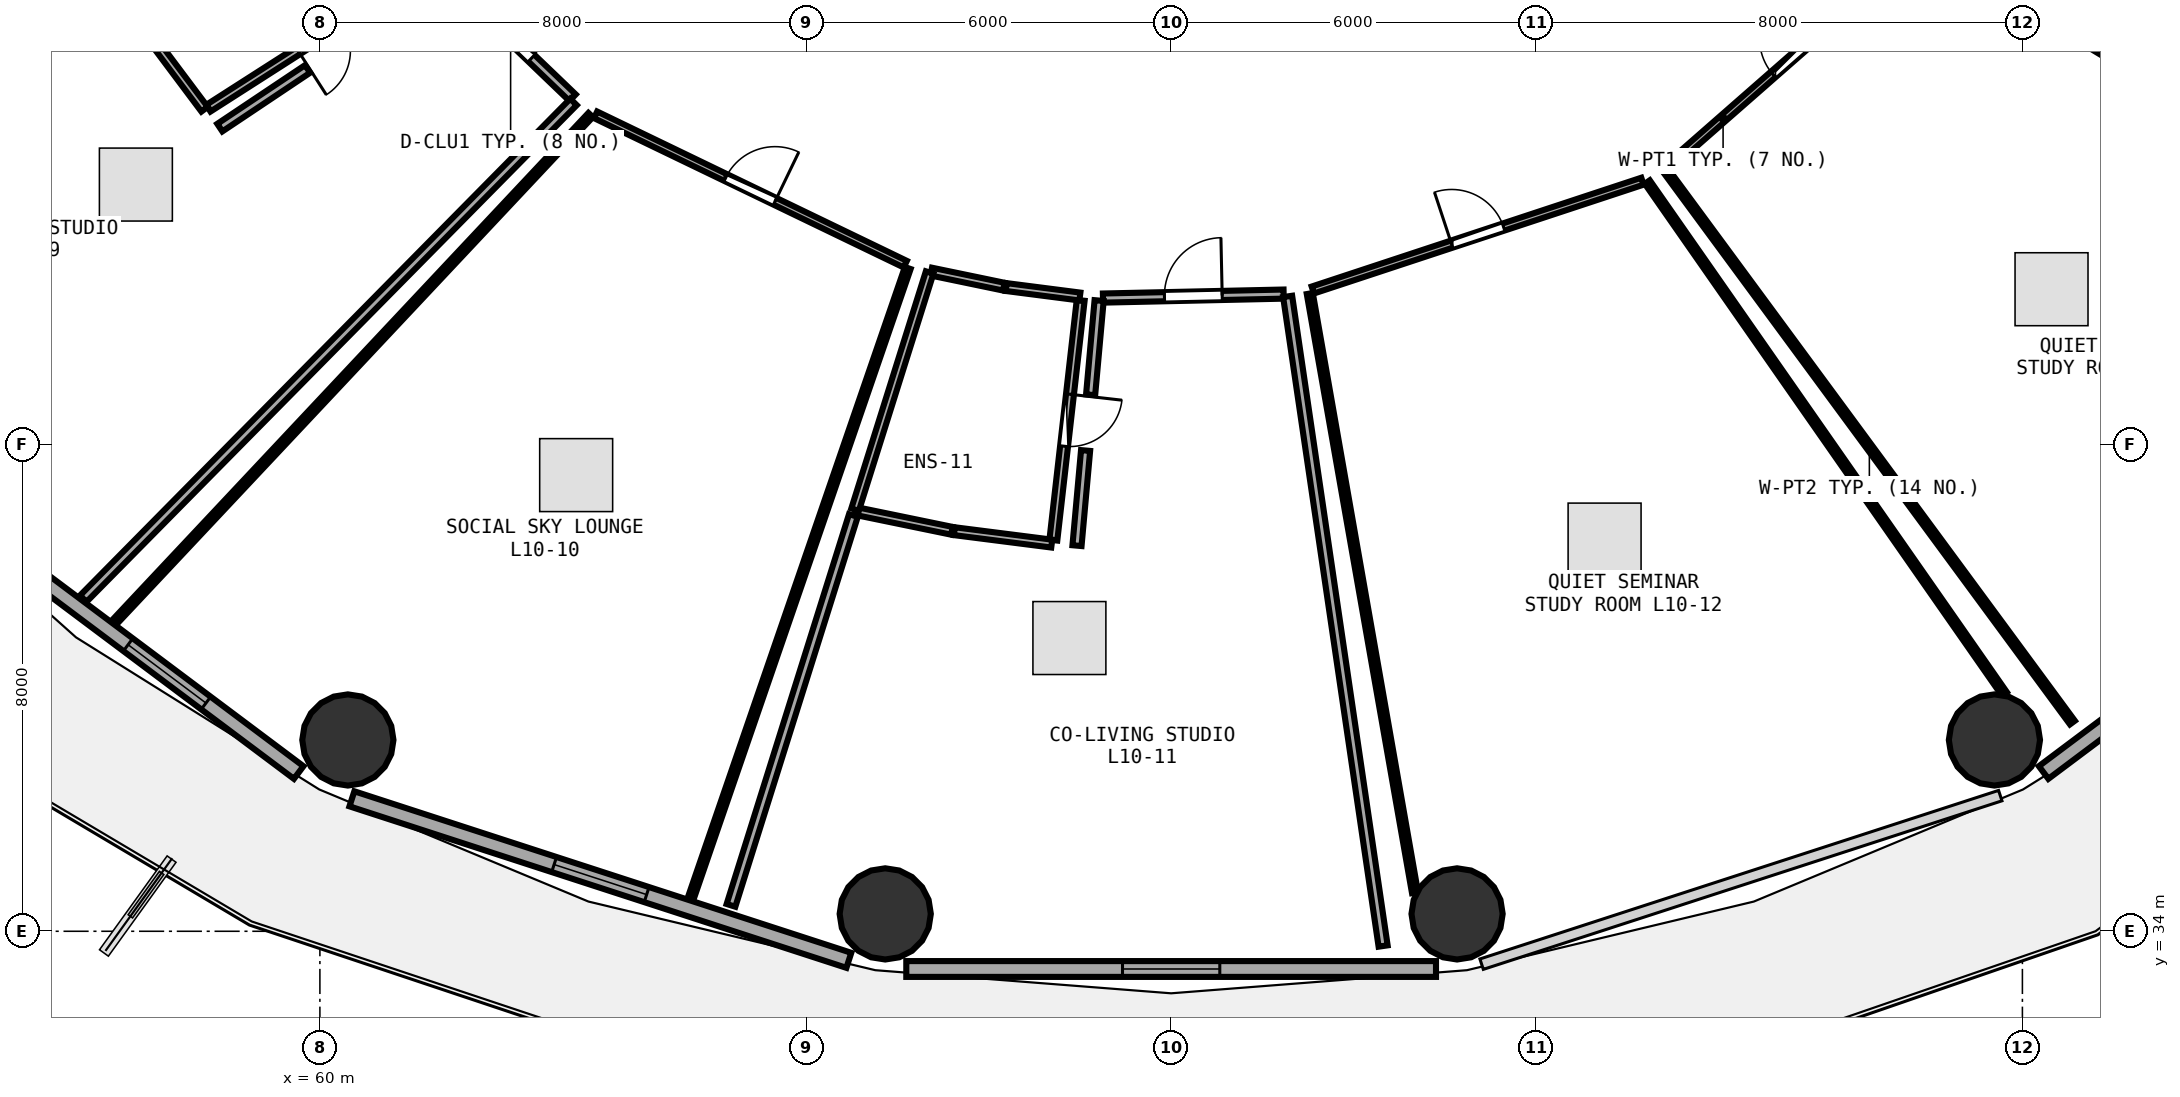
"""IFC4 building model, lengths in metres.
Left out: names, types, materials, properties, quantities, classifications, styles, units other than length and angle.
Written with IfcOpenShell. Run it as: python <this file> out.ifc"""

import sys

from ifc_helpers import new_model, si_unit, direction, frame, frame_2d, origin, origin_2d, place, context, subcontext, project, spatial, rectangle, circle, extrude, element, fill, save


model = new_model("IFC4")
c1 = context("Model", 3, precision=1e-05, world=origin(), true_north=direction((0.0, 1.0)))
c2 = subcontext(c1, "Body", "Model", "MODEL_VIEW")
j1 = project(units=[si_unit("LENGTHUNIT", "METRE"), si_unit("PLANEANGLEUNIT", "RADIAN")], contexts=[c1])
p1 = place(None, origin())
s1 = spatial("IfcSite", under=j1, at=p1, CompositionType="ELEMENT")
p2 = place(p1, origin())
s2 = spatial("IfcBuilding", under=s1, at=p2, CompositionType="ELEMENT")
p3 = place(p2, frame((0.0, 0.0, 41.25)))
s3 = spatial("IfcBuildingStorey", under=s2, at=p3, CompositionType="ELEMENT", Elevation=41.25)
for number, where, z_axis, x_axis in (
    (1, (60.46, 37.146, 0.0), (0.0, 0.0, 1.0), (1.0, 0.0, 0.0)),
    (2, (69.298, 34.286, 0.0), (0.0, 0.0, 1.0), (1.0, 0.0, 0.0)),
    (3, (78.702, 34.286, 0.0), (0.0, 0.0, 1.0), (1.0, 0.0, 0.0)),
    (4, (87.54, 37.146, 0.0), (0.0, 0.0, 1.0), (1.0, 0.0, 0.0)),
):
    element("IfcColumn", number, at=place(p3, frame(where, z_axis=z_axis, x_axis=x_axis)), inside=s3, PredefinedType="COLUMN", context=c2, shape_type="SweptSolid", body=[
        extrude(circle(Radius=0.75, at=origin_2d()), origin(), (0.0, 0.0, 1.0), 3.75),
    ])
p4 = place(p3, frame((53.016, 41.582, 0.0), z_axis=(0.0, 0.0, 1.0), x_axis=(0.80030733173, -0.599590005569, 0.0)))
e5 = element("IfcWall", 5, at=p4, inside=s3, PredefinedType="SOLIDWALL", context=c2, shape_type="SweptSolid", body=[
    extrude(rectangle(XDim=8.291, YDim=0.26, at=frame_2d((4.145, 0.0))), origin(), (0.0, 0.0, 1.0), 3.475),
])
p5 = place(p4, frame((4.785, 0.0, 0.85)))
e6 = element("IfcOpeningElement", 6, at=p5, cuts=e5, PredefinedType="OPENING", context=c2, shape_type="SweptSolid", body=[
    extrude(rectangle(XDim=1.6, YDim=1.45, at=frame_2d((0.8, 0.725))), frame((0.0, 0.14, 0.0), z_axis=(0.0, -1.0, 0.0), x_axis=(1.0, 0.0, 0.0)), (0.0, 0.0, 1.0), 0.28),
])
p6 = place(p3, frame((60.526, 36.178, 0.0), z_axis=(0.0, 0.0, 1.0), x_axis=(0.951039914291, -0.309068085421, 0.0)))
e7 = element("IfcWall", 7, at=p6, inside=s3, PredefinedType="SOLIDWALL", context=c2, shape_type="SweptSolid", body=[
    extrude(rectangle(XDim=8.594, YDim=0.26, at=frame_2d((4.297, 0.0))), origin(), (0.0, 0.0, 1.0), 3.475),
])
p7 = place(p6, frame((3.497, 0.0, 0.85)))
e8 = element("IfcOpeningElement", 8, at=p7, cuts=e7, PredefinedType="OPENING", context=c2, shape_type="SweptSolid", body=[
    extrude(rectangle(XDim=1.6, YDim=1.45, at=frame_2d((0.8, 0.725))), frame((0.0, 0.14, 0.0), z_axis=(0.0, -1.0, 0.0), x_axis=(1.0, 0.0, 0.0)), (0.0, 0.0, 1.0), 0.28),
])
p8 = place(p3, frame((69.644, 33.38, 0.0), z_axis=(0.0, 0.0, 1.0), x_axis=(1.0, 0.0, 0.0)))
e9 = element("IfcWall", 9, at=p8, inside=s3, PredefinedType="SOLIDWALL", context=c2, shape_type="SweptSolid", body=[
    extrude(rectangle(XDim=8.712, YDim=0.26, at=frame_2d((4.356, 0.0))), origin(), (0.0, 0.0, 1.0), 3.475),
])
p9 = place(p8, frame((3.556, 0.0, 0.85)))
e10 = element("IfcOpeningElement", 10, at=p9, cuts=e9, PredefinedType="OPENING", context=c2, shape_type="SweptSolid", body=[
    extrude(rectangle(XDim=1.6, YDim=1.45, at=frame_2d((0.8, 0.725))), frame((0.0, 0.14, 0.0), z_axis=(0.0, -1.0, 0.0), x_axis=(1.0, 0.0, 0.0)), (0.0, 0.0, 1.0), 0.28),
])
p10 = place(p3, frame((88.349, 36.611, 0.0), z_axis=(0.0, 0.0, 1.0), x_axis=(0.80030733173, 0.599590005569, 0.0)))
e11 = element("IfcWall", 11, at=p10, inside=s3, PredefinedType="SOLIDWALL", context=c2, shape_type="SweptSolid", body=[
    extrude(rectangle(XDim=8.291, YDim=0.26, at=frame_2d((4.145, 0.0))), origin(), (0.0, 0.0, 1.0), 3.475),
])
p11 = place(p10, frame((3.345, 0.0, 0.85)))
e12 = element("IfcOpeningElement", 12, at=p11, cuts=e11, PredefinedType="OPENING", context=c2, shape_type="SweptSolid", body=[
    extrude(rectangle(XDim=1.6, YDim=1.45, at=frame_2d((0.8, 0.725))), frame((0.0, 0.14, 0.0), z_axis=(0.0, -1.0, 0.0), x_axis=(1.0, 0.0, 0.0)), (0.0, 0.0, 1.0), 0.28),
])
p12 = place(p3, frame((61.844, 49.89, 0.0), z_axis=(0.0, 0.0, 1.0), x_axis=(-0.842235862163, -0.539109221297, 0.0)))
e13 = element("IfcWall", 13, at=p12, inside=s3, PredefinedType="PLUMBINGWALL", context=c2, shape_type="SweptSolid", body=[
    extrude(rectangle(XDim=4.367, YDim=0.13, at=frame_2d((2.184, 0.0))), origin(), (0.0, 0.0, 1.0), 3.235),
])
p13 = place(p12, frame((1.754, 0.0, 0.0)))
e14 = element("IfcOpeningElement", 14, at=p13, cuts=e13, PredefinedType="OPENING", context=c2, shape_type="SweptSolid", body=[
    extrude(rectangle(XDim=0.86, YDim=2.05, at=frame_2d((0.43, 1.025))), frame((0.0, 0.075, 0.0), z_axis=(0.0, -1.0, 0.0), x_axis=(1.0, 0.0, 0.0)), (0.0, 0.0, 1.0), 0.15),
])
p14 = place(p3, frame((62.118, 49.663, 0.0), z_axis=(0.0, 0.0, 1.0), x_axis=(0.721698326825, -0.692207718144, 0.0)))
e15 = element("IfcWall", 15, at=p14, inside=s3, PredefinedType="PARTITIONING", context=c2, shape_type="SweptSolid", body=[
    extrude(rectangle(XDim=2.823, YDim=0.15, at=frame_2d((1.412, 0.0))), origin(), (0.0, 0.0, 1.0), 2.875),
])
p15 = place(p14, frame((0.936, 0.0, 0.0)))
e16 = element("IfcOpeningElement", 16, at=p15, cuts=e15, PredefinedType="OPENING", context=c2, shape_type="SweptSolid", body=[
    extrude(rectangle(XDim=0.95, YDim=2.08, at=frame_2d((0.475, 1.04))), frame((0.0, 0.085, 0.0), z_axis=(0.0, -1.0, 0.0), x_axis=(1.0, 0.0, 0.0)), (0.0, 0.0, 1.0), 0.17),
])
p16 = place(p3, frame((64.534, 47.427, 0.0), z_axis=(0.0, 0.0, 1.0), x_axis=(0.900751487373, -0.434334845477, 0.0)))
e17 = element("IfcWall", 17, at=p16, inside=s3, PredefinedType="PARTITIONING", context=c2, shape_type="SweptSolid", body=[
    extrude(rectangle(XDim=5.654, YDim=0.12, at=frame_2d((2.827, 0.0))), origin(), (0.0, 0.0, 1.0), 2.875),
])
p17 = place(p16, frame((2.377, 0.0, 0.0)))
e18 = element("IfcOpeningElement", 18, at=p17, cuts=e17, PredefinedType="OPENING", context=c2, shape_type="SweptSolid", body=[
    extrude(rectangle(XDim=0.9, YDim=2.08, at=frame_2d((0.45, 1.04))), frame((0.0, 0.07, 0.0), z_axis=(0.0, -1.0, 0.0), x_axis=(1.0, 0.0, 0.0)), (0.0, 0.0, 1.0), 0.14),
])
p18 = place(p3, frame((72.512, 44.376, 0.0), z_axis=(0.0, 0.0, 1.0), x_axis=(-0.113232612293, -0.993568505697, 0.0)))
e19 = element("IfcWall", 19, at=p18, inside=s3, PredefinedType="PLUMBINGWALL", context=c2, shape_type="SweptSolid", body=[
    extrude(rectangle(XDim=3.969, YDim=0.13, at=frame_2d((1.985, 0.0))), origin(), (0.0, 0.0, 1.0), 3.175),
])
p19 = place(p18, frame((1.555, 0.0, 0.0)))
e20 = element("IfcOpeningElement", 20, at=p19, cuts=e19, PredefinedType="OPENING", context=c2, shape_type="SweptSolid", body=[
    extrude(rectangle(XDim=0.86, YDim=2.05, at=frame_2d((0.43, 1.025))), frame((0.0, 0.075, 0.0), z_axis=(0.0, -1.0, 0.0), x_axis=(1.0, 0.0, 0.0)), (0.0, 0.0, 1.0), 0.15),
])
p20 = place(p3, frame((72.879, 44.413, 0.0), z_axis=(0.0, 0.0, 1.0), x_axis=(0.999757617916, 0.022016026426, 0.0)))
e21 = element("IfcWall", 21, at=p20, inside=s3, PredefinedType="PARTITIONING", context=c2, shape_type="SweptSolid", body=[
    extrude(rectangle(XDim=2.972, YDim=0.15, at=frame_2d((1.486, 0.0))), origin(), (0.0, 0.0, 1.0), 3.48),
])
p21 = place(p20, frame((1.011, 0.0, 0.0)))
e22 = element("IfcOpeningElement", 22, at=p21, cuts=e21, PredefinedType="OPENING", context=c2, shape_type="SweptSolid", body=[
    extrude(rectangle(XDim=0.95, YDim=2.08, at=frame_2d((0.475, 1.04))), frame((0.0, 0.085, 0.0), z_axis=(0.0, -1.0, 0.0), x_axis=(1.0, 0.0, 0.0)), (0.0, 0.0, 1.0), 0.17),
])
p22 = place(p3, frame((76.33, 44.546, 0.0), z_axis=(0.0, 0.0, 1.0), x_axis=(0.949607265123, 0.313442246716, 0.0)))
e23 = element("IfcWall", 23, at=p22, inside=s3, PredefinedType="PARTITIONING", context=c2, shape_type="SweptSolid", body=[
    extrude(rectangle(XDim=5.708, YDim=0.12, at=frame_2d((2.854, 0.0))), origin(), (0.0, 0.0, 1.0), 2.875),
])
p23 = place(p22, frame((2.404, 0.0, 0.0)))
e24 = element("IfcOpeningElement", 24, at=p23, cuts=e23, PredefinedType="OPENING", context=c2, shape_type="SweptSolid", body=[
    extrude(rectangle(XDim=0.9, YDim=2.08, at=frame_2d((0.45, 1.04))), frame((0.0, 0.07, 0.0), z_axis=(0.0, -1.0, 0.0), x_axis=(1.0, 0.0, 0.0)), (0.0, 0.0, 1.0), 0.14),
])
p24 = place(p3, frame((82.165, 46.57, 0.0), z_axis=(0.0, 0.0, 1.0), x_axis=(0.752285806045, 0.658836903963, 0.0)))
e25 = element("IfcWall", 25, at=p24, inside=s3, PredefinedType="PARTITIONING", context=c2, shape_type="SweptSolid", body=[
    extrude(rectangle(XDim=5.512, YDim=0.12, at=frame_2d((2.756, 0.0))), origin(), (0.0, 0.0, 1.0), 2.875),
])
p25 = place(p24, frame((2.306, 0.0, 0.0)))
e26 = element("IfcOpeningElement", 26, at=p25, cuts=e25, PredefinedType="OPENING", context=c2, shape_type="SweptSolid", body=[
    extrude(rectangle(XDim=0.9, YDim=2.08, at=frame_2d((0.45, 1.04))), frame((0.0, 0.07, 0.0), z_axis=(0.0, -1.0, 0.0), x_axis=(1.0, 0.0, 0.0)), (0.0, 0.0, 1.0), 0.14),
])
p26 = place(p3, frame((60.375, 52.16, 0.0), z_axis=(0.0, 0.0, 1.0), x_axis=(-0.924608681042, -0.380918346817, 0.0)))
e27 = element("IfcWall", 27, at=p26, inside=s3, PredefinedType="PARTITIONING", context=c2, shape_type="SweptSolid", body=[
    extrude(rectangle(XDim=12.094, YDim=0.1, at=frame_2d((6.047, 0.0))), origin(), (0.0, 0.0, 1.0), 2.875),
])
p27 = place(p3, frame((58.103, 47.519, 0.0), z_axis=(0.0, 0.0, 1.0), x_axis=(-0.599662382917, 0.800253101533, 0.0)))
e28 = element("IfcWall", 28, at=p27, inside=s3, PredefinedType="PLUMBINGWALL", context=c2, shape_type="SweptSolid", body=[
    extrude(rectangle(XDim=1.504, YDim=0.13, at=frame_2d((0.752, 0.0))), origin(), (0.0, 0.0, 1.0), 3.48),
])
p28 = place(p3, frame((64.171, 47.638, 0.0), z_axis=(0.0, 0.0, 1.0), x_axis=(-0.702465266663, -0.711718026421, 0.0)))
e29 = element("IfcWall", 29, at=p28, inside=s3, PredefinedType="PARTITIONING", context=c2, shape_type="SweptSolid", body=[
    extrude(rectangle(XDim=11.478, YDim=0.15, at=frame_2d((5.739, 0.0))), origin(), (0.0, 0.0, 1.0), 2.875),
])
p29 = place(p3, frame((49.487, 47.017, 0.0), z_axis=(0.0, 0.0, 1.0), x_axis=(0.915920983282, 0.401358633124, 0.0)))
e30 = element("IfcWall", 30, at=p29, inside=s3, PredefinedType="PARTITIONING", context=c2, shape_type="SweptSolid", body=[
    extrude(rectangle(XDim=7.449, YDim=0.15, at=frame_2d((3.725, 0.0))), origin(), (0.0, 0.0, 1.0), 2.875),
])
p30 = place(p3, frame((58.354, 47.216, 0.0), z_axis=(0.0, 0.0, 1.0), x_axis=(0.831292382958, 0.555835383937, 0.0)))
e31 = element("IfcWall", 31, at=p30, inside=s3, PredefinedType="PARTITIONING", context=c2, shape_type="SweptSolid", body=[
    extrude(rectangle(XDim=1.736, YDim=0.15, at=frame_2d((0.868, 0.0))), origin(), (0.0, 0.0, 1.0), 3.48),
])
p31 = place(p3, frame((69.668, 44.907, 0.0), z_axis=(0.0, 0.0, 1.0), x_axis=(-0.325549997896, -0.94552482721, 0.0)))
e32 = element("IfcWall", 32, at=p31, inside=s3, PredefinedType="PARTITIONING", context=c2, shape_type="SweptSolid", body=[
    extrude(rectangle(XDim=10.911, YDim=0.1, at=frame_2d((5.456, 0.0))), origin(), (0.0, 0.0, 1.0), 2.875),
])
p32 = place(p3, frame((56.622, 39.085, 0.0), z_axis=(0.0, 0.0, 1.0), x_axis=(0.684539394854, 0.728975868526, 0.0)))
e33 = element("IfcWall", 33, at=p32, inside=s3, PredefinedType="PARTITIONING", context=c2, shape_type="SweptSolid", body=[
    extrude(rectangle(XDim=11.439, YDim=0.1, at=frame_2d((5.719, 0.0))), origin(), (0.0, 0.0, 1.0), 2.875),
])
p33 = place(p3, frame((70.054, 44.849, 0.0), z_axis=(0.0, 0.0, 1.0), x_axis=(0.979121805859, -0.203274418684, 0.0)))
e34 = element("IfcWall", 34, at=p33, inside=s3, PredefinedType="PLUMBINGWALL", context=c2, shape_type="SweptSolid", body=[
    extrude(rectangle(XDim=1.219, YDim=0.13, at=frame_2d((0.609, 0.0))), origin(), (0.0, 0.0, 1.0), 3.235),
])
p34 = place(p3, frame((71.287, 44.594, 0.0), z_axis=(0.0, 0.0, 1.0), x_axis=(0.991848040681, -0.127426308891, 0.0)))
e35 = element("IfcWall", 35, at=p34, inside=s3, PredefinedType="PLUMBINGWALL", context=c2, shape_type="SweptSolid", body=[
    extrude(rectangle(XDim=1.222, YDim=0.13, at=frame_2d((0.611, 0.0))), origin(), (0.0, 0.0, 1.0), 3.235),
])
p35 = place(p3, frame((72.036, 40.375, 0.0), z_axis=(0.0, 0.0, 1.0), x_axis=(-0.991984482756, 0.126359748222, 0.0)))
e36 = element("IfcWall", 36, at=p35, inside=s3, PredefinedType="PLUMBINGWALL", context=c2, shape_type="SweptSolid", body=[
    extrude(rectangle(XDim=1.615, YDim=0.13, at=frame_2d((0.808, 0.0))), origin(), (0.0, 0.0, 1.0), 3.48),
])
p36 = place(p3, frame((70.394, 40.586, 0.0), z_axis=(0.0, 0.0, 1.0), x_axis=(-0.979464082354, 0.201618727747, 0.0)))
e37 = element("IfcWall", 37, at=p36, inside=s3, PredefinedType="PLUMBINGWALL", context=c2, shape_type="SweptSolid", body=[
    extrude(rectangle(XDim=1.612, YDim=0.13, at=frame_2d((0.806, 0.0))), origin(), (0.0, 0.0, 1.0), 3.175),
])
p37 = place(p3, frame((68.802, 40.934, 0.0), z_axis=(0.0, 0.0, 1.0), x_axis=(0.299913557671, 0.953966381968, 0.0)))
e38 = element("IfcWall", 38, at=p37, inside=s3, PredefinedType="PLUMBINGWALL", context=c2, shape_type="SweptSolid", body=[
    extrude(rectangle(XDim=4.088, YDim=0.13, at=frame_2d((2.044, 0.0))), origin(), (0.0, 0.0, 1.0), 3.175),
])
p38 = place(p3, frame((75.916, 44.44, 0.0), z_axis=(0.0, 0.0, 1.0), x_axis=(0.145430849227, -0.989368418787, 0.0)))
e39 = element("IfcWall", 39, at=p38, inside=s3, PredefinedType="PARTITIONING", context=c2, shape_type="SweptSolid", body=[
    extrude(rectangle(XDim=10.798, YDim=0.15, at=frame_2d((5.399, 0.0))), origin(), (0.0, 0.0, 1.0), 2.875),
])
p39 = place(p3, frame((66.761, 34.426, 0.0), z_axis=(0.0, 0.0, 1.0), x_axis=(0.299536567827, 0.954084820409, 0.0)))
e40 = element("IfcWall", 40, at=p39, inside=s3, PredefinedType="PARTITIONING", context=c2, shape_type="SweptSolid", body=[
    extrude(rectangle(XDim=6.72, YDim=0.15, at=frame_2d((3.36, 0.0))), origin(), (0.0, 0.0, 1.0), 2.875),
])
p40 = place(p3, frame((72.452, 40.342, 0.0), z_axis=(0.0, 0.0, 1.0), x_axis=(0.089821137984, 0.995957912349, 0.0)))
e41 = element("IfcWall", 41, at=p40, inside=s3, PredefinedType="PARTITIONING", context=c2, shape_type="SweptSolid", body=[
    extrude(rectangle(XDim=1.571, YDim=0.15, at=frame_2d((0.786, 0.0))), origin(), (0.0, 0.0, 1.0), 3.175),
])
p41 = place(p3, frame((72.676, 42.823, 0.0), z_axis=(0.0, 0.0, 1.0), x_axis=(0.089927260711, 0.9959483359, 0.0)))
e42 = element("IfcWall", 42, at=p41, inside=s3, PredefinedType="PARTITIONING", context=c2, shape_type="SweptSolid", body=[
    extrude(rectangle(XDim=1.556, YDim=0.15, at=frame_2d((0.778, 0.0))), origin(), (0.0, 0.0, 1.0), 3.48),
])
p42 = place(p3, frame((81.831, 46.321, 0.0), z_axis=(0.0, 0.0, 1.0), x_axis=(0.572190897837, -0.820120464586, 0.0)))
e43 = element("IfcWall", 43, at=p42, inside=s3, PredefinedType="PARTITIONING", context=c2, shape_type="SweptSolid", body=[
    extrude(rectangle(XDim=10.264, YDim=0.1, at=frame_2d((5.132, 0.0))), origin(), (0.0, 0.0, 1.0), 2.875),
])
p43 = place(p3, frame((78.01, 34.635, 0.0), z_axis=(0.0, 0.0, 1.0), x_axis=(-0.173016726169, 0.984918886237, 0.0)))
e44 = element("IfcWall", 44, at=p43, inside=s3, PredefinedType="PARTITIONING", context=c2, shape_type="SweptSolid", body=[
    extrude(rectangle(XDim=10.003, YDim=0.1, at=frame_2d((5.001, 0.0))), origin(), (0.0, 0.0, 1.0), 3.175),
])
p44 = place(p3, frame((86.391, 50.22, 0.0), z_axis=(0.0, 0.0, 1.0), x_axis=(0.856195030458, -0.516652755551, 0.0)))
e45 = element("IfcWall", 45, at=p44, inside=s3, PredefinedType="PARTITIONING", context=c2, shape_type="SweptSolid", body=[
    extrude(rectangle(XDim=11.875, YDim=0.1, at=frame_2d((5.938, 0.0))), origin(), (0.0, 0.0, 1.0), 2.875),
])
p45 = place(p3, frame((88.822, 37.432, 0.0), z_axis=(0.0, 0.0, 1.0), x_axis=(-0.593112501052, 0.805119594281, 0.0)))
e46 = element("IfcWall", 46, at=p45, inside=s3, PredefinedType="PARTITIONING", context=c2, shape_type="SweptSolid", body=[
    extrude(rectangle(XDim=11.26, YDim=0.1, at=frame_2d((5.63, 0.0))), origin(), (0.0, 0.0, 1.0), 2.875),
])
p46 = place(p3, frame((90.466, 48.285, 0.0), z_axis=(0.0, 0.0, 1.0), x_axis=(-0.868102152808, 0.496385588319, 0.0)))
e47 = element("IfcWall", 47, at=p46, inside=s3, PredefinedType="PLUMBINGWALL", context=c2, shape_type="SweptSolid", body=[
    extrude(rectangle(XDim=4.477, YDim=0.13, at=frame_2d((2.238, 0.0))), origin(), (0.0, 0.0, 1.0), 2.875),
])
p47 = place(p5, origin())
e48 = element("IfcWindow", 48, at=p47, inside=s3, PartitioningType="SINGLE_PANEL", PredefinedType="WINDOW", context=c2, shape_type="SweptSolid", body=[
    extrude(rectangle(XDim=1.6, YDim=1.45, at=frame_2d((0.8, 0.725))), frame((0.0, 0.03, 0.0), z_axis=(0.0, -1.0, 0.0), x_axis=(1.0, 0.0, 0.0)), (0.0, 0.0, 1.0), 0.06),
])
fill(e6, e48)
p48 = place(p7, origin())
e49 = element("IfcWindow", 49, at=p48, inside=s3, PartitioningType="SINGLE_PANEL", PredefinedType="WINDOW", context=c2, shape_type="SweptSolid", body=[
    extrude(rectangle(XDim=1.6, YDim=1.45, at=frame_2d((0.8, 0.725))), frame((0.0, 0.03, 0.0), z_axis=(0.0, -1.0, 0.0), x_axis=(1.0, 0.0, 0.0)), (0.0, 0.0, 1.0), 0.06),
])
fill(e8, e49)
p49 = place(p9, origin())
e50 = element("IfcWindow", 50, at=p49, inside=s3, PartitioningType="SINGLE_PANEL", PredefinedType="WINDOW", context=c2, shape_type="SweptSolid", body=[
    extrude(rectangle(XDim=1.6, YDim=1.45, at=frame_2d((0.8, 0.725))), frame((0.0, 0.03, 0.0), z_axis=(0.0, -1.0, 0.0), x_axis=(1.0, 0.0, 0.0)), (0.0, 0.0, 1.0), 0.06),
])
fill(e10, e50)
p50 = place(p15, origin())
e51 = element("IfcDoor", 51, at=p50, inside=s3, OperationType="SINGLE_SWING_LEFT", PredefinedType="DOOR", context=c2, shape_type="SweptSolid", body=[
    extrude(rectangle(XDim=0.95, YDim=2.08, at=frame_2d((0.475, 1.04))), frame((0.0, 0.025, 0.0), z_axis=(0.0, -1.0, 0.0), x_axis=(1.0, 0.0, 0.0)), (0.0, 0.0, 1.0), 0.05),
])
fill(e16, e51)
p51 = place(p17, origin())
e52 = element("IfcDoor", 52, at=p51, inside=s3, OperationType="SINGLE_SWING_RIGHT", PredefinedType="DOOR", context=c2, shape_type="SweptSolid", body=[
    extrude(rectangle(XDim=0.9, YDim=2.08, at=frame_2d((0.45, 1.04))), frame((0.0, 0.025, 0.0), z_axis=(0.0, -1.0, 0.0), x_axis=(1.0, 0.0, 0.0)), (0.0, 0.0, 1.0), 0.05),
])
fill(e18, e52)
p52 = place(p19, origin())
e53 = element("IfcDoor", 53, at=p52, inside=s3, OperationType="SINGLE_SWING_LEFT", PredefinedType="DOOR", context=c2, shape_type="SweptSolid", body=[
    extrude(rectangle(XDim=0.86, YDim=2.05, at=frame_2d((0.43, 1.025))), frame((0.0, 0.025, 0.0), z_axis=(0.0, -1.0, 0.0), x_axis=(1.0, 0.0, 0.0)), (0.0, 0.0, 1.0), 0.05),
])
fill(e20, e53)
p53 = place(p21, origin())
e54 = element("IfcDoor", 54, at=p53, inside=s3, OperationType="SINGLE_SWING_RIGHT", PredefinedType="DOOR", context=c2, shape_type="SweptSolid", body=[
    extrude(rectangle(XDim=0.95, YDim=2.08, at=frame_2d((0.475, 1.04))), frame((0.0, 0.025, 0.0), z_axis=(0.0, -1.0, 0.0), x_axis=(1.0, 0.0, 0.0)), (0.0, 0.0, 1.0), 0.05),
])
fill(e22, e54)
p54 = place(p23, origin())
e55 = element("IfcDoor", 55, at=p54, inside=s3, OperationType="SINGLE_SWING_LEFT", PredefinedType="DOOR", context=c2, shape_type="SweptSolid", body=[
    extrude(rectangle(XDim=0.9, YDim=2.08, at=frame_2d((0.45, 1.04))), frame((0.0, 0.025, 0.0), z_axis=(0.0, -1.0, 0.0), x_axis=(1.0, 0.0, 0.0)), (0.0, 0.0, 1.0), 0.05),
])
fill(e24, e55)
p55 = place(p25, origin())
e56 = element("IfcDoor", 56, at=p55, inside=s3, OperationType="SINGLE_SWING_RIGHT", PredefinedType="DOOR", context=c2, shape_type="SweptSolid", body=[
    extrude(rectangle(XDim=0.9, YDim=2.08, at=frame_2d((0.45, 1.04))), frame((0.0, 0.025, 0.0), z_axis=(0.0, -1.0, 0.0), x_axis=(1.0, 0.0, 0.0)), (0.0, 0.0, 1.0), 0.05),
])
fill(e26, e56)
save(model, sys.argv[1])
